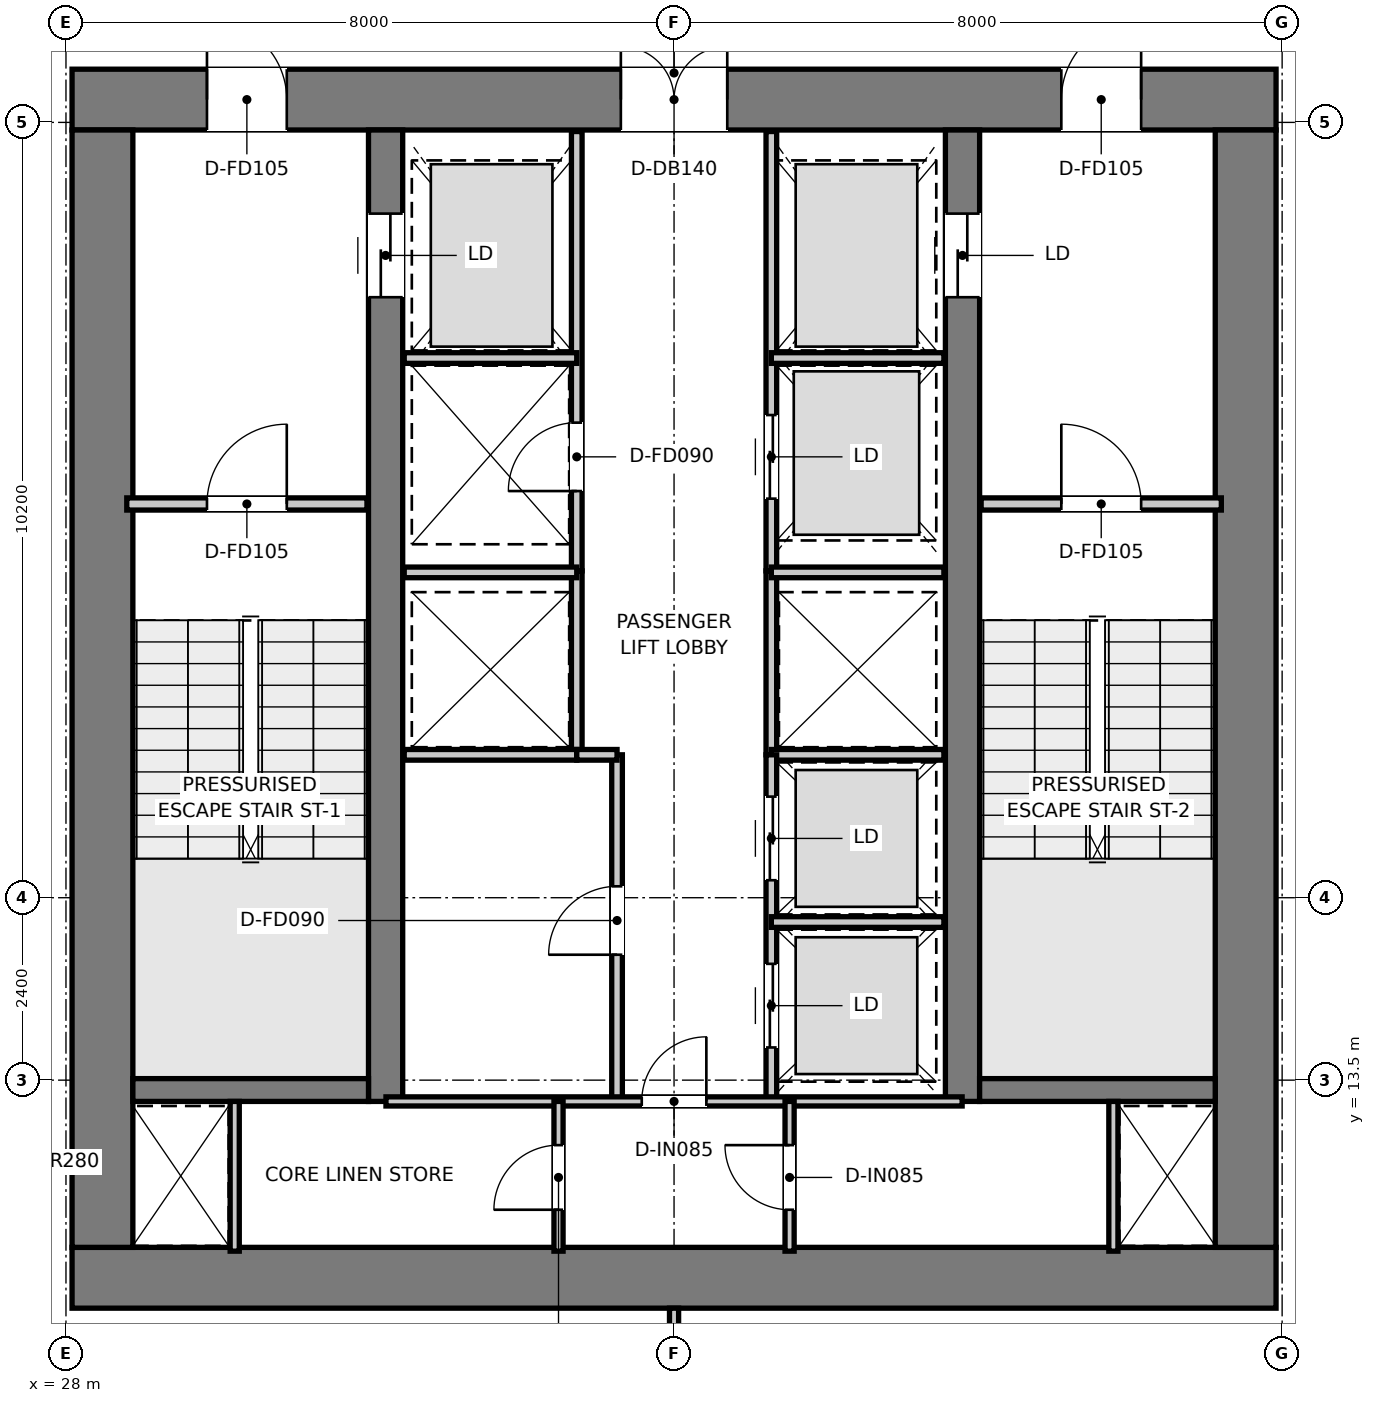
"""IFC4 building model, lengths in metres.
Left out: names, types, materials, properties, quantities, classifications, styles, units other than length and angle.
Written with IfcOpenShell. Run it as: python <this file> out.ifc"""

import sys

from ifc_helpers import new_model, si_unit, direction, frame, frame_2d, origin, place, context, subcontext, project, spatial, rectangle, extrude, element, fill, save


model = new_model("IFC4")
c1 = context("Model", 3, precision=1e-05, world=origin(), true_north=direction((0.0, 1.0)))
c2 = subcontext(c1, "Body", "Model", "MODEL_VIEW")
j1 = project(units=[si_unit("LENGTHUNIT", "METRE"), si_unit("PLANEANGLEUNIT", "RADIAN")], contexts=[c1])
p1 = place(None, origin())
s1 = spatial("IfcSite", under=j1, at=p1, CompositionType="ELEMENT")
p2 = place(p1, origin())
s2 = spatial("IfcBuilding", under=s1, at=p2, CompositionType="ELEMENT")
p3 = place(p2, frame((0.0, 0.0, 234.95)))
s3 = spatial("IfcBuildingStorey", under=s2, at=p3, CompositionType="ELEMENT", Elevation=234.95)
p4 = place(p3, frame((28.08, 10.9, 0.0), z_axis=(0.0, 0.0, 1.0), x_axis=(1.0, 0.0, 0.0)))
e1 = element("IfcWall", 1, at=p4, inside=s3, PredefinedType="SHEAR", context=c2, shape_type="SweptSolid", body=[
    extrude(rectangle(XDim=15.84, YDim=0.8, at=frame_2d((7.92, 0.0))), origin(), (0.0, 0.0, 1.0), 3.95),
])
p5 = place(p3, frame((28.08, 26.4, 0.0), z_axis=(0.0, 0.0, 1.0), x_axis=(1.0, 0.0, 0.0)))
e2 = element("IfcWall", 2, at=p5, inside=s3, PredefinedType="SHEAR", context=c2, shape_type="SweptSolid", body=[
    extrude(rectangle(XDim=15.84, YDim=0.8, at=frame_2d((7.92, 0.0))), origin(), (0.0, 0.0, 1.0), 3.95),
])
p6 = place(p5, frame((7.22, 0.0, 0.0)))
e3 = element("IfcOpeningElement", 3, at=p6, cuts=e2, PredefinedType="OPENING", context=c2, shape_type="SweptSolid", body=[
    extrude(rectangle(XDim=1.4, YDim=2.2, at=frame_2d((0.7, 1.1))), frame((0.0, 0.41, 0.0), z_axis=(0.0, -1.0, 0.0), x_axis=(1.0, 0.0, 0.0)), (0.0, 0.0, 1.0), 0.82),
])
p7 = place(p5, frame((1.775, 0.0, 0.0)))
e4 = element("IfcOpeningElement", 4, at=p7, cuts=e2, PredefinedType="OPENING", context=c2, shape_type="SweptSolid", body=[
    extrude(rectangle(XDim=1.05, YDim=2.1, at=frame_2d((0.525, 1.05))), frame((0.0, 0.41, 0.0), z_axis=(0.0, -1.0, 0.0), x_axis=(1.0, 0.0, 0.0)), (0.0, 0.0, 1.0), 0.82),
])
p8 = place(p5, frame((13.015, 0.0, 0.0)))
e5 = element("IfcOpeningElement", 5, at=p8, cuts=e2, PredefinedType="OPENING", context=c2, shape_type="SweptSolid", body=[
    extrude(rectangle(XDim=1.05, YDim=2.1, at=frame_2d((0.525, 1.05))), frame((0.0, 0.41, 0.0), z_axis=(0.0, -1.0, 0.0), x_axis=(1.0, 0.0, 0.0)), (0.0, 0.0, 1.0), 0.82),
])
for number, where, z_axis, x_axis in (
    (6, (28.48, 11.3, 0.0), (0.0, 0.0, 1.0), (0.0, 1.0, 0.0)),
    (7, (43.52, 11.3, 0.0), (0.0, 0.0, 1.0), (0.0, 1.0, 0.0)),
):
    element("IfcWall", number, at=place(p3, frame(where, z_axis=z_axis, x_axis=x_axis)), inside=s3, PredefinedType="SHEAR", context=c2, shape_type="SweptSolid", body=[
        extrude(rectangle(XDim=14.7, YDim=0.8, at=frame_2d((7.35, 0.0))), origin(), (0.0, 0.0, 1.0), 3.95),
    ])
p9 = place(p3, frame((32.205, 13.22, 0.0), z_axis=(0.0, 0.0, 1.0), x_axis=(0.0, 1.0, 0.0)))
e8 = element("IfcWall", 8, at=p9, inside=s3, PredefinedType="SHEAR", context=c2, shape_type="SweptSolid", body=[
    extrude(rectangle(XDim=12.78, YDim=0.45, at=frame_2d((6.39, 0.0))), origin(), (0.0, 0.0, 1.0), 3.95),
])
p10 = place(p9, frame((10.58, 0.0, 0.0)))
e9 = element("IfcOpeningElement", 9, at=p10, cuts=e8, PredefinedType="OPENING", context=c2, shape_type="SweptSolid", body=[
    extrude(rectangle(XDim=1.1, YDim=2.15, at=frame_2d((0.55, 1.075))), frame((0.0, 0.235, 0.0), z_axis=(0.0, -1.0, 0.0), x_axis=(1.0, 0.0, 0.0)), (0.0, 0.0, 1.0), 0.47),
])
p11 = place(p3, frame((39.795, 13.22, 0.0), z_axis=(0.0, 0.0, 1.0), x_axis=(0.0, 1.0, 0.0)))
e10 = element("IfcWall", 10, at=p11, inside=s3, PredefinedType="SHEAR", context=c2, shape_type="SweptSolid", body=[
    extrude(rectangle(XDim=12.78, YDim=0.45, at=frame_2d((6.39, 0.0))), origin(), (0.0, 0.0, 1.0), 3.95),
])
p12 = place(p11, frame((10.58, 0.0, 0.0)))
e11 = element("IfcOpeningElement", 11, at=p12, cuts=e10, PredefinedType="OPENING", context=c2, shape_type="SweptSolid", body=[
    extrude(rectangle(XDim=1.1, YDim=2.15, at=frame_2d((0.55, 1.075))), frame((0.0, 0.235, 0.0), z_axis=(0.0, -1.0, 0.0), x_axis=(1.0, 0.0, 0.0)), (0.0, 0.0, 1.0), 0.47),
])
for number, where, z_axis, x_axis in (
    (12, (28.88, 13.37, 0.0), (0.0, 0.0, 1.0), (1.0, 0.0, 0.0)),
    (13, (40.02, 13.37, 0.0), (0.0, 0.0, 1.0), (1.0, 0.0, 0.0)),
):
    element("IfcWall", number, at=place(p3, frame(where, z_axis=z_axis, x_axis=x_axis)), inside=s3, PredefinedType="SHEAR", context=c2, shape_type="SweptSolid", body=[
        extrude(rectangle(XDim=3.1, YDim=0.3, at=frame_2d((1.55, 0.0))), origin(), (0.0, 0.0, 1.0), 3.95),
    ])
p13 = place(p3, frame((28.8, 21.08, 0.0), z_axis=(0.0, 0.0, 1.0), x_axis=(1.0, 0.0, 0.0)))
e14 = element("IfcWall", 14, at=p13, inside=s3, PredefinedType="PARTITIONING", context=c2, shape_type="SweptSolid", body=[
    extrude(rectangle(XDim=3.16, YDim=0.16, at=frame_2d((1.58, 0.0))), origin(), (0.0, 0.0, 1.0), 3.67),
])
p14 = place(p13, frame((1.055, 0.0, 0.0)))
e15 = element("IfcOpeningElement", 15, at=p14, cuts=e14, PredefinedType="OPENING", context=c2, shape_type="SweptSolid", body=[
    extrude(rectangle(XDim=1.05, YDim=2.1, at=frame_2d((0.525, 1.05))), frame((0.0, 0.09, 0.0), z_axis=(0.0, -1.0, 0.0), x_axis=(1.0, 0.0, 0.0)), (0.0, 0.0, 1.0), 0.18),
])
p15 = place(p3, frame((40.04, 21.08, 0.0), z_axis=(0.0, 0.0, 1.0), x_axis=(1.0, 0.0, 0.0)))
e16 = element("IfcWall", 16, at=p15, inside=s3, PredefinedType="PARTITIONING", context=c2, shape_type="SweptSolid", body=[
    extrude(rectangle(XDim=3.16, YDim=0.16, at=frame_2d((1.58, 0.0))), origin(), (0.0, 0.0, 1.0), 3.67),
])
p16 = place(p15, frame((1.055, 0.0, 0.0)))
e17 = element("IfcOpeningElement", 17, at=p16, cuts=e16, PredefinedType="OPENING", context=c2, shape_type="SweptSolid", body=[
    extrude(rectangle(XDim=1.05, YDim=2.1, at=frame_2d((0.525, 1.05))), frame((0.0, 0.09, 0.0), z_axis=(0.0, -1.0, 0.0), x_axis=(1.0, 0.0, 0.0)), (0.0, 0.0, 1.0), 0.18),
])
p17 = place(p3, frame((34.72, 20.2, 0.0), z_axis=(0.0, 0.0, 1.0), x_axis=(0.0, 1.0, 0.0)))
e18 = element("IfcWall", 18, at=p17, inside=s3, PredefinedType="PARTITIONING", context=c2, shape_type="SweptSolid", body=[
    extrude(rectangle(XDim=5.78, YDim=0.14, at=frame_2d((2.89, 0.0))), origin(), (0.0, 0.0, 1.0), 2.67),
])
p18 = place(p17, frame((1.05, 0.0, 0.0)))
e19 = element("IfcOpeningElement", 19, at=p18, cuts=e18, PredefinedType="OPENING", context=c2, shape_type="SweptSolid", body=[
    extrude(rectangle(XDim=0.9, YDim=2.1, at=frame_2d((0.45, 1.05))), frame((0.0, 0.08, 0.0), z_axis=(0.0, -1.0, 0.0), x_axis=(1.0, 0.0, 0.0)), (0.0, 0.0, 1.0), 0.16),
])
p19 = place(p3, frame((37.28, 20.2, 0.0), z_axis=(0.0, 0.0, 1.0), x_axis=(0.0, 1.0, 0.0)))
e20 = element("IfcWall", 20, at=p19, inside=s3, PredefinedType="PARTITIONING", context=c2, shape_type="SweptSolid", body=[
    extrude(rectangle(XDim=5.78, YDim=0.14, at=frame_2d((2.89, 0.0))), origin(), (0.0, 0.0, 1.0), 2.67),
])
p20 = place(p19, frame((0.95, 0.0, 0.0)))
e21 = element("IfcOpeningElement", 21, at=p20, cuts=e20, PredefinedType="OPENING", context=c2, shape_type="SweptSolid", body=[
    extrude(rectangle(XDim=1.1, YDim=2.15, at=frame_2d((0.55, 1.075))), frame((0.0, 0.08, 0.0), z_axis=(0.0, -1.0, 0.0), x_axis=(1.0, 0.0, 0.0)), (0.0, 0.0, 1.0), 0.16),
])
for number, where, z_axis, x_axis in (
    (22, (32.45, 23.0, 0.0), (0.0, 0.0, 1.0), (1.0, 0.0, 0.0)),
    (23, (37.28, 23.0, 0.0), (0.0, 0.0, 1.0), (1.0, 0.0, 0.0)),
):
    element("IfcWall", number, at=place(p3, frame(where, z_axis=z_axis, x_axis=x_axis)), inside=s3, PredefinedType="PARTITIONING", context=c2, shape_type="SweptSolid", body=[
        extrude(rectangle(XDim=2.27, YDim=0.14, at=frame_2d((1.135, 0.0))), origin(), (0.0, 0.0, 1.0), 2.67),
    ])
for number, where, z_axis, x_axis in (
    (24, (34.72, 17.78, 0.0), (0.0, 0.0, 1.0), (0.0, 1.0, 0.0)),
    (25, (37.28, 17.78, 0.0), (0.0, 0.0, 1.0), (0.0, 1.0, 0.0)),
):
    element("IfcWall", number, at=place(p3, frame(where, z_axis=z_axis, x_axis=x_axis)), inside=s3, PredefinedType="PARTITIONING", context=c2, shape_type="SweptSolid", body=[
        extrude(rectangle(XDim=2.42, YDim=0.14, at=frame_2d((1.21, 0.0))), origin(), (0.0, 0.0, 1.0), 3.67),
    ])
for number, where, z_axis, x_axis in (
    (26, (32.45, 17.78, 0.0), (0.0, 0.0, 1.0), (1.0, 0.0, 0.0)),
    (27, (32.45, 20.18, 0.0), (0.0, 0.0, 1.0), (1.0, 0.0, 0.0)),
    (28, (37.28, 17.78, 0.0), (0.0, 0.0, 1.0), (1.0, 0.0, 0.0)),
    (29, (37.28, 20.18, 0.0), (0.0, 0.0, 1.0), (1.0, 0.0, 0.0)),
):
    element("IfcWall", number, at=place(p3, frame(where, z_axis=z_axis, x_axis=x_axis)), inside=s3, PredefinedType="PARTITIONING", context=c2, shape_type="SweptSolid", body=[
        extrude(rectangle(XDim=2.27, YDim=0.14, at=frame_2d((1.135, 0.0))), origin(), (0.0, 0.0, 1.0), 3.67),
    ])
p21 = place(p3, frame((35.25, 13.22, 0.0), z_axis=(0.0, 0.0, 1.0), x_axis=(0.0, 1.0, 0.0)))
e30 = element("IfcWall", 30, at=p21, inside=s3, PredefinedType="PARTITIONING", context=c2, shape_type="SweptSolid", body=[
    extrude(rectangle(XDim=4.56, YDim=0.14, at=frame_2d((2.28, 0.0))), origin(), (0.0, 0.0, 1.0), 3.67),
])
p22 = place(p21, frame((1.93, 0.0, 0.0)))
e31 = element("IfcOpeningElement", 31, at=p22, cuts=e30, PredefinedType="OPENING", context=c2, shape_type="SweptSolid", body=[
    extrude(rectangle(XDim=0.9, YDim=2.1, at=frame_2d((0.45, 1.05))), frame((0.0, 0.08, 0.0), z_axis=(0.0, -1.0, 0.0), x_axis=(1.0, 0.0, 0.0)), (0.0, 0.0, 1.0), 0.16),
])
p23 = place(p3, frame((34.72, 17.78, 0.0), z_axis=(0.0, 0.0, 1.0), x_axis=(1.0, 0.0, 0.0)))
e32 = element("IfcWall", 32, at=p23, inside=s3, PredefinedType="PARTITIONING", context=c2, shape_type="SweptSolid", body=[
    extrude(rectangle(XDim=0.53, YDim=0.14, at=frame_2d((0.265, 0.0))), origin(), (0.0, 0.0, 1.0), 3.67),
])
p24 = place(p3, frame((37.28, 13.22, 0.0), z_axis=(0.0, 0.0, 1.0), x_axis=(0.0, 1.0, 0.0)))
e33 = element("IfcWall", 33, at=p24, inside=s3, PredefinedType="PARTITIONING", context=c2, shape_type="SweptSolid", body=[
    extrude(rectangle(XDim=4.56, YDim=0.14, at=frame_2d((2.28, 0.0))), origin(), (0.0, 0.0, 1.0), 3.67),
])
p25 = place(p24, frame((0.71, 0.0, 0.0)))
e34 = element("IfcOpeningElement", 34, at=p25, cuts=e33, PredefinedType="OPENING", context=c2, shape_type="SweptSolid", body=[
    extrude(rectangle(XDim=1.1, YDim=2.15, at=frame_2d((0.55, 1.075))), frame((0.0, 0.08, 0.0), z_axis=(0.0, -1.0, 0.0), x_axis=(1.0, 0.0, 0.0)), (0.0, 0.0, 1.0), 0.16),
])
p26 = place(p24, frame((2.91, 0.0, 0.0)))
e35 = element("IfcOpeningElement", 35, at=p26, cuts=e33, PredefinedType="OPENING", context=c2, shape_type="SweptSolid", body=[
    extrude(rectangle(XDim=1.1, YDim=2.15, at=frame_2d((0.55, 1.075))), frame((0.0, 0.08, 0.0), z_axis=(0.0, -1.0, 0.0), x_axis=(1.0, 0.0, 0.0)), (0.0, 0.0, 1.0), 0.16),
])
p27 = place(p3, frame((37.28, 15.58, 0.0), z_axis=(0.0, 0.0, 1.0), x_axis=(1.0, 0.0, 0.0)))
e36 = element("IfcWall", 36, at=p27, inside=s3, PredefinedType="PARTITIONING", context=c2, shape_type="SweptSolid", body=[
    extrude(rectangle(XDim=2.27, YDim=0.14, at=frame_2d((1.135, 0.0))), origin(), (0.0, 0.0, 1.0), 3.67),
])
for number, where, z_axis, x_axis in (
    (37, (30.22, 11.25, 0.0), (0.0, 0.0, 1.0), (0.0, 1.0, 0.0)),
    (38, (41.78, 11.25, 0.0), (0.0, 0.0, 1.0), (0.0, 1.0, 0.0)),
):
    element("IfcWall", number, at=place(p3, frame(where, z_axis=z_axis, x_axis=x_axis)), inside=s3, PredefinedType="PARTITIONING", context=c2, shape_type="SweptSolid", body=[
        extrude(rectangle(XDim=1.97, YDim=0.12, at=frame_2d((0.985, 0.0))), origin(), (0.0, 0.0, 1.0), 3.67),
    ])
p28 = place(p3, frame((32.21, 13.22, 0.0), z_axis=(0.0, 0.0, 1.0), x_axis=(1.0, 0.0, 0.0)))
e39 = element("IfcWall", 39, at=p28, inside=s3, PredefinedType="PARTITIONING", context=c2, shape_type="SweptSolid", body=[
    extrude(rectangle(XDim=7.58, YDim=0.12, at=frame_2d((3.79, 0.0))), origin(), (0.0, 0.0, 1.0), 3.67),
])
p29 = place(p28, frame((3.365, 0.0, 0.0)))
e40 = element("IfcOpeningElement", 40, at=p29, cuts=e39, PredefinedType="OPENING", context=c2, shape_type="SweptSolid", body=[
    extrude(rectangle(XDim=0.85, YDim=2.1, at=frame_2d((0.425, 1.05))), frame((0.0, 0.07, 0.0), z_axis=(0.0, -1.0, 0.0), x_axis=(1.0, 0.0, 0.0)), (0.0, 0.0, 1.0), 0.14),
])
p30 = place(p3, frame((34.48, 11.25, 0.0), z_axis=(0.0, 0.0, 1.0), x_axis=(0.0, 1.0, 0.0)))
e41 = element("IfcWall", 41, at=p30, inside=s3, PredefinedType="PARTITIONING", context=c2, shape_type="SweptSolid", body=[
    extrude(rectangle(XDim=1.97, YDim=0.12, at=frame_2d((0.985, 0.0))), origin(), (0.0, 0.0, 1.0), 3.67),
])
p31 = place(p30, frame((0.545, 0.0, 0.0)))
e42 = element("IfcOpeningElement", 42, at=p31, cuts=e41, PredefinedType="OPENING", context=c2, shape_type="SweptSolid", body=[
    extrude(rectangle(XDim=0.85, YDim=2.1, at=frame_2d((0.425, 1.05))), frame((0.0, 0.07, 0.0), z_axis=(0.0, -1.0, 0.0), x_axis=(1.0, 0.0, 0.0)), (0.0, 0.0, 1.0), 0.14),
])
p32 = place(p3, frame((37.52, 11.25, 0.0), z_axis=(0.0, 0.0, 1.0), x_axis=(0.0, 1.0, 0.0)))
e43 = element("IfcWall", 43, at=p32, inside=s3, PredefinedType="PARTITIONING", context=c2, shape_type="SweptSolid", body=[
    extrude(rectangle(XDim=1.97, YDim=0.12, at=frame_2d((0.985, 0.0))), origin(), (0.0, 0.0, 1.0), 3.67),
])
p33 = place(p32, frame((0.545, 0.0, 0.0)))
e44 = element("IfcOpeningElement", 44, at=p33, cuts=e43, PredefinedType="OPENING", context=c2, shape_type="SweptSolid", body=[
    extrude(rectangle(XDim=0.85, YDim=2.1, at=frame_2d((0.425, 1.05))), frame((0.0, 0.07, 0.0), z_axis=(0.0, -1.0, 0.0), x_axis=(1.0, 0.0, 0.0)), (0.0, 0.0, 1.0), 0.14),
])
p34 = place(p3, frame((36.0, 4.955, 0.0), z_axis=(0.0, 0.0, 1.0), x_axis=(0.0, 1.0, 0.0)))
e45 = element("IfcWall", 45, at=p34, inside=s3, PredefinedType="PARTITIONING", context=c2, shape_type="SweptSolid", body=[
    extrude(rectangle(XDim=5.545, YDim=0.12, at=frame_2d((2.772, 0.0))), origin(), (0.0, 0.0, 1.0), 3.67),
])
p35 = place(p14, origin())
e46 = element("IfcDoor", 46, at=p35, inside=s3, OperationType="SINGLE_SWING_RIGHT", PredefinedType="DOOR", context=c2, shape_type="SweptSolid", body=[
    extrude(rectangle(XDim=1.05, YDim=2.1, at=frame_2d((0.525, 1.05))), frame((0.0, 0.025, 0.0), z_axis=(0.0, -1.0, 0.0), x_axis=(1.0, 0.0, 0.0)), (0.0, 0.0, 1.0), 0.05),
])
fill(e15, e46)
p36 = place(p16, origin())
e47 = element("IfcDoor", 47, at=p36, inside=s3, OperationType="SINGLE_SWING_LEFT", PredefinedType="DOOR", context=c2, shape_type="SweptSolid", body=[
    extrude(rectangle(XDim=1.05, YDim=2.1, at=frame_2d((0.525, 1.05))), frame((0.0, 0.025, 0.0), z_axis=(0.0, -1.0, 0.0), x_axis=(1.0, 0.0, 0.0)), (0.0, 0.0, 1.0), 0.05),
])
fill(e17, e47)
p37 = place(p6, origin())
e48 = element("IfcDoor", 48, at=p37, inside=s3, OperationType="DOUBLE_DOOR_SINGLE_SWING", PredefinedType="DOOR", context=c2, shape_type="SweptSolid", body=[
    extrude(rectangle(XDim=1.4, YDim=2.2, at=frame_2d((0.7, 1.1))), frame((0.0, 0.025, 0.0), z_axis=(0.0, -1.0, 0.0), x_axis=(1.0, 0.0, 0.0)), (0.0, 0.0, 1.0), 0.05),
])
fill(e3, e48)
p38 = place(p7, origin())
e49 = element("IfcDoor", 49, at=p38, inside=s3, OperationType="SINGLE_SWING_LEFT", PredefinedType="DOOR", context=c2, shape_type="SweptSolid", body=[
    extrude(rectangle(XDim=1.05, YDim=2.1, at=frame_2d((0.525, 1.05))), frame((0.0, 0.025, 0.0), z_axis=(0.0, -1.0, 0.0), x_axis=(1.0, 0.0, 0.0)), (0.0, 0.0, 1.0), 0.05),
])
fill(e4, e49)
p39 = place(p8, origin())
e50 = element("IfcDoor", 50, at=p39, inside=s3, OperationType="SINGLE_SWING_RIGHT", PredefinedType="DOOR", context=c2, shape_type="SweptSolid", body=[
    extrude(rectangle(XDim=1.05, YDim=2.1, at=frame_2d((0.525, 1.05))), frame((0.0, 0.025, 0.0), z_axis=(0.0, -1.0, 0.0), x_axis=(1.0, 0.0, 0.0)), (0.0, 0.0, 1.0), 0.05),
])
fill(e5, e50)
p40 = place(p10, origin())
e51 = element("IfcDoor", 51, at=p40, inside=s3, OperationType="DOUBLE_DOOR_SLIDING", PredefinedType="DOOR", context=c2, shape_type="SweptSolid", body=[
    extrude(rectangle(XDim=1.1, YDim=2.15, at=frame_2d((0.55, 1.075))), frame((0.0, 0.025, 0.0), z_axis=(0.0, -1.0, 0.0), x_axis=(1.0, 0.0, 0.0)), (0.0, 0.0, 1.0), 0.05),
])
fill(e9, e51)
p41 = place(p12, origin())
e52 = element("IfcDoor", 52, at=p41, inside=s3, OperationType="DOUBLE_DOOR_SLIDING", PredefinedType="DOOR", context=c2, shape_type="SweptSolid", body=[
    extrude(rectangle(XDim=1.1, YDim=2.15, at=frame_2d((0.55, 1.075))), frame((0.0, 0.025, 0.0), z_axis=(0.0, -1.0, 0.0), x_axis=(1.0, 0.0, 0.0)), (0.0, 0.0, 1.0), 0.05),
])
fill(e11, e52)
p42 = place(p18, origin())
e53 = element("IfcDoor", 53, at=p42, inside=s3, OperationType="SINGLE_SWING_LEFT", PredefinedType="DOOR", context=c2, shape_type="SweptSolid", body=[
    extrude(rectangle(XDim=0.9, YDim=2.1, at=frame_2d((0.45, 1.05))), frame((0.0, 0.025, 0.0), z_axis=(0.0, -1.0, 0.0), x_axis=(1.0, 0.0, 0.0)), (0.0, 0.0, 1.0), 0.05),
])
fill(e19, e53)
p43 = place(p20, origin())
e54 = element("IfcDoor", 54, at=p43, inside=s3, OperationType="DOUBLE_DOOR_SLIDING", PredefinedType="DOOR", context=c2, shape_type="SweptSolid", body=[
    extrude(rectangle(XDim=1.1, YDim=2.15, at=frame_2d((0.55, 1.075))), frame((0.0, 0.025, 0.0), z_axis=(0.0, -1.0, 0.0), x_axis=(1.0, 0.0, 0.0)), (0.0, 0.0, 1.0), 0.05),
])
fill(e21, e54)
p44 = place(p22, origin())
e55 = element("IfcDoor", 55, at=p44, inside=s3, OperationType="SINGLE_SWING_LEFT", PredefinedType="DOOR", context=c2, shape_type="SweptSolid", body=[
    extrude(rectangle(XDim=0.9, YDim=2.1, at=frame_2d((0.45, 1.05))), frame((0.0, 0.025, 0.0), z_axis=(0.0, -1.0, 0.0), x_axis=(1.0, 0.0, 0.0)), (0.0, 0.0, 1.0), 0.05),
])
fill(e31, e55)
p45 = place(p25, origin())
e56 = element("IfcDoor", 56, at=p45, inside=s3, OperationType="DOUBLE_DOOR_SLIDING", PredefinedType="DOOR", context=c2, shape_type="SweptSolid", body=[
    extrude(rectangle(XDim=1.1, YDim=2.15, at=frame_2d((0.55, 1.075))), frame((0.0, 0.025, 0.0), z_axis=(0.0, -1.0, 0.0), x_axis=(1.0, 0.0, 0.0)), (0.0, 0.0, 1.0), 0.05),
])
fill(e34, e56)
p46 = place(p26, origin())
e57 = element("IfcDoor", 57, at=p46, inside=s3, OperationType="DOUBLE_DOOR_SLIDING", PredefinedType="DOOR", context=c2, shape_type="SweptSolid", body=[
    extrude(rectangle(XDim=1.1, YDim=2.15, at=frame_2d((0.55, 1.075))), frame((0.0, 0.025, 0.0), z_axis=(0.0, -1.0, 0.0), x_axis=(1.0, 0.0, 0.0)), (0.0, 0.0, 1.0), 0.05),
])
fill(e35, e57)
p47 = place(p29, origin())
e58 = element("IfcDoor", 58, at=p47, inside=s3, OperationType="SINGLE_SWING_RIGHT", PredefinedType="DOOR", context=c2, shape_type="SweptSolid", body=[
    extrude(rectangle(XDim=0.85, YDim=2.1, at=frame_2d((0.425, 1.05))), frame((0.0, 0.025, 0.0), z_axis=(0.0, -1.0, 0.0), x_axis=(1.0, 0.0, 0.0)), (0.0, 0.0, 1.0), 0.05),
])
fill(e40, e58)
p48 = place(p31, origin())
e59 = element("IfcDoor", 59, at=p48, inside=s3, OperationType="SINGLE_SWING_LEFT", PredefinedType="DOOR", context=c2, shape_type="SweptSolid", body=[
    extrude(rectangle(XDim=0.85, YDim=2.1, at=frame_2d((0.425, 1.05))), frame((0.0, 0.025, 0.0), z_axis=(0.0, -1.0, 0.0), x_axis=(1.0, 0.0, 0.0)), (0.0, 0.0, 1.0), 0.05),
])
fill(e42, e59)
p49 = place(p33, origin())
e60 = element("IfcDoor", 60, at=p49, inside=s3, OperationType="SINGLE_SWING_RIGHT", PredefinedType="DOOR", context=c2, shape_type="SweptSolid", body=[
    extrude(rectangle(XDim=0.85, YDim=2.1, at=frame_2d((0.425, 1.05))), frame((0.0, 0.025, 0.0), z_axis=(0.0, -1.0, 0.0), x_axis=(1.0, 0.0, 0.0)), (0.0, 0.0, 1.0), 0.05),
])
fill(e44, e60)
save(model, sys.argv[1])
